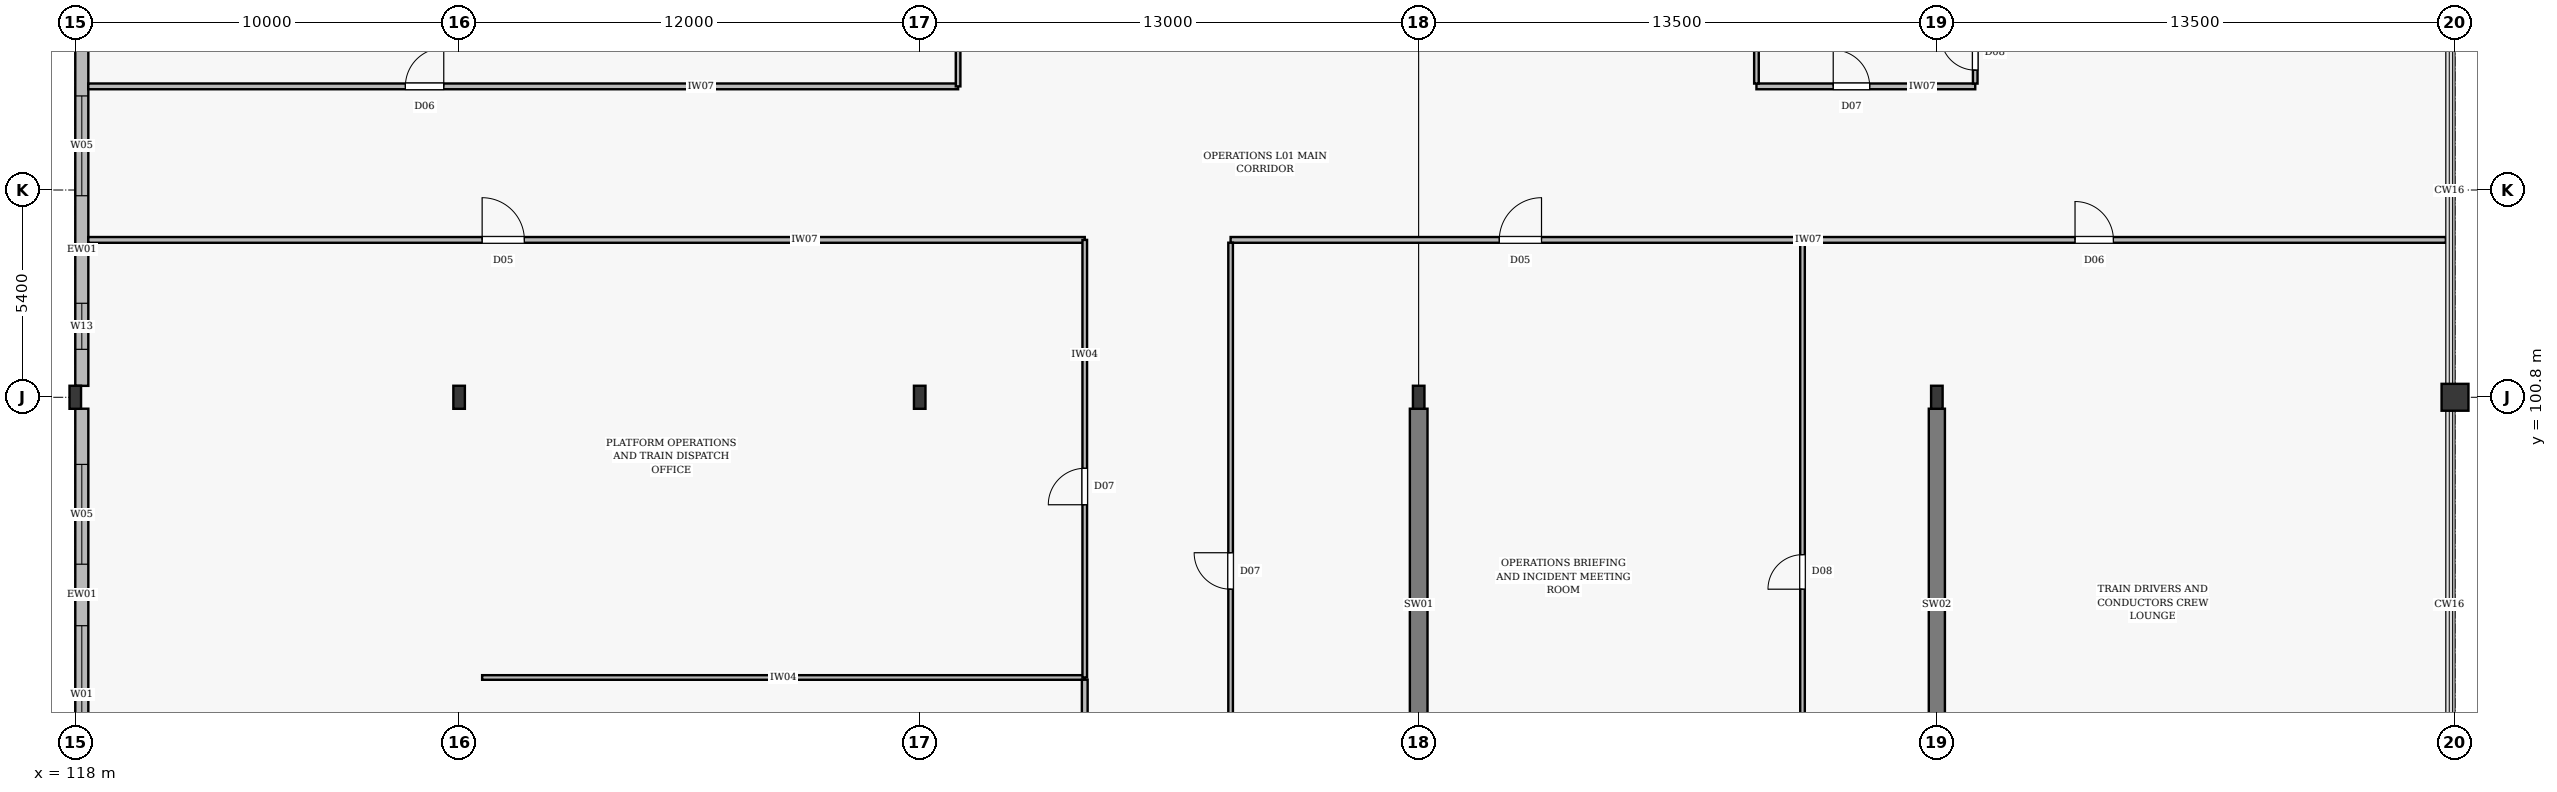
"""IFC4 building model, lengths in metres.
Left out: names, types, materials, properties, quantities, classifications, styles, units other than length and angle.
Written with IfcOpenShell. Run it as: python <this file> out.ifc"""

import sys

from ifc_helpers import new_model, si_unit, direction, frame, frame_2d, origin, origin_2d, place, context, subcontext, project, spatial, rectangle, i_section, extrude, element, fill, save


model = new_model("IFC4")
c1 = context("Model", 3, precision=1e-05, world=origin(), true_north=direction((0.0, 1.0)))
c2 = subcontext(c1, "Body", "Model", "MODEL_VIEW")
j1 = project(units=[si_unit("LENGTHUNIT", "METRE"), si_unit("PLANEANGLEUNIT", "RADIAN")], contexts=[c1])
p1 = place(None, origin())
s1 = spatial("IfcSite", under=j1, at=p1, CompositionType="ELEMENT")
p2 = place(p1, origin())
s2 = spatial("IfcBuilding", under=s1, at=p2, CompositionType="ELEMENT")
p3 = place(p2, frame((0.0, 0.0, 6.6)))
s3 = spatial("IfcBuildingStorey", under=s2, at=p3, CompositionType="ELEMENT", Elevation=6.6)
for number, where, z_axis, x_axis in (
    (1, (118.0, 100.8, 0.0), (0.0, 0.0, 1.0), (1.0, 0.0, 0.0)),
    (2, (128.0, 100.8, 0.0), (0.0, 0.0, 1.0), (1.0, 0.0, 0.0)),
    (3, (140.0, 100.8, 0.0), (0.0, 0.0, 1.0), (1.0, 0.0, 0.0)),
    (4, (153.0, 100.8, 0.0), (0.0, 0.0, 1.0), (1.0, 0.0, 0.0)),
    (5, (166.5, 100.8, 0.0), (0.0, 0.0, 1.0), (1.0, 0.0, 0.0)),
):
    element("IfcColumn", number, at=place(p3, frame(where, z_axis=z_axis, x_axis=x_axis)), inside=s3, PredefinedType="COLUMN", context=c2, shape_type="SweptSolid", body=[
        extrude(i_section(OverallWidth=0.3, OverallDepth=0.6, WebThickness=0.015, FlangeThickness=0.029, at=origin_2d()), origin(), (0.0, 0.0, 1.0), 6.0),
    ])
p4 = place(p3, frame((180.0, 100.8, 0.0), z_axis=(0.0, 0.0, 1.0), x_axis=(1.0, 0.0, 0.0)))
e6 = element("IfcColumn", 6, at=p4, inside=s3, PredefinedType="COLUMN", context=c2, shape_type="SweptSolid", body=[
    extrude(rectangle(XDim=0.7, YDim=0.7, at=origin_2d()), origin(), (0.0, 0.0, 1.0), 6.0),
])
p5 = place(p3, frame((153.0, 90.298, 0.0), z_axis=(0.0, 0.0, 1.0), x_axis=(0.0, 1.0, 0.0)))
e7 = element("IfcWall", 7, at=p5, inside=s3, PredefinedType="SHEAR", context=c2, shape_type="SweptSolid", body=[
    extrude(rectangle(XDim=10.204, YDim=0.46, at=frame_2d((5.102, 0.0))), origin(), (0.0, 0.0, 1.0), 5.75),
])
p6 = place(p3, frame((166.5, 90.298, 0.0), z_axis=(0.0, 0.0, 1.0), x_axis=(0.0, 1.0, 0.0)))
e8 = element("IfcWall", 8, at=p6, inside=s3, PredefinedType="SHEAR", context=c2, shape_type="SweptSolid", body=[
    extrude(rectangle(XDim=10.204, YDim=0.42, at=frame_2d((5.102, 0.0))), origin(), (0.0, 0.0, 1.0), 5.75),
])
p7 = place(p3, frame((118.17, 90.298, 0.0), z_axis=(0.0, 0.0, 1.0), x_axis=(0.0, 1.0, 0.0)))
e9 = element("IfcWall", 9, at=p7, inside=s3, PredefinedType="STANDARD", context=c2, shape_type="SweptSolid", body=[
    extrude(rectangle(XDim=10.204, YDim=0.34, at=frame_2d((5.102, 0.0))), origin(), (0.0, 0.0, 1.0), 5.15),
])
p8 = place(p7, frame((0.951, 0.0, 0.75)))
e10 = element("IfcOpeningElement", 10, at=p8, cuts=e9, PredefinedType="OPENING", context=c2, shape_type="SweptSolid", body=[
    extrude(rectangle(XDim=3.6, YDim=2.8, at=frame_2d((1.8, 1.4))), frame((0.0, 0.182, 0.0), z_axis=(0.0, -1.0, 0.0), x_axis=(1.0, 0.0, 0.0)), (0.0, 0.0, 1.0), 0.364),
])
p9 = place(p7, frame((6.153, 0.0, 0.75)))
e11 = element("IfcOpeningElement", 11, at=p9, cuts=e9, PredefinedType="OPENING", context=c2, shape_type="SweptSolid", body=[
    extrude(rectangle(XDim=2.6, YDim=2.4, at=frame_2d((1.3, 1.2))), frame((0.0, 0.182, 0.0), z_axis=(0.0, -1.0, 0.0), x_axis=(1.0, 0.0, 0.0)), (0.0, 0.0, 1.0), 0.364),
])
p10 = place(p3, frame((118.17, 101.098, 0.0), z_axis=(0.0, 0.0, 1.0), x_axis=(0.0, 1.0, 0.0)))
e12 = element("IfcWall", 12, at=p10, inside=s3, PredefinedType="STANDARD", context=c2, shape_type="SweptSolid", body=[
    extrude(rectangle(XDim=10.204, YDim=0.34, at=frame_2d((5.102, 0.0))), origin(), (0.0, 0.0, 1.0), 5.15),
])
p11 = place(p10, frame((0.951, 0.0, 0.75)))
e13 = element("IfcOpeningElement", 13, at=p11, cuts=e12, PredefinedType="OPENING", context=c2, shape_type="SweptSolid", body=[
    extrude(rectangle(XDim=1.2, YDim=1.8, at=frame_2d((0.6, 0.9))), frame((0.0, 0.182, 0.0), z_axis=(0.0, -1.0, 0.0), x_axis=(1.0, 0.0, 0.0)), (0.0, 0.0, 1.0), 0.364),
])
p12 = place(p10, frame((4.953, 0.0, 0.75)))
e14 = element("IfcOpeningElement", 14, at=p12, cuts=e12, PredefinedType="OPENING", context=c2, shape_type="SweptSolid", body=[
    extrude(rectangle(XDim=2.6, YDim=2.4, at=frame_2d((1.3, 1.2))), frame((0.0, 0.182, 0.0), z_axis=(0.0, -1.0, 0.0), x_axis=(1.0, 0.0, 0.0)), (0.0, 0.0, 1.0), 0.364),
])
p13 = place(p3, frame((118.338, 104.9, 0.0), z_axis=(0.0, 0.0, 1.0), x_axis=(1.0, 0.0, 0.0)))
e15 = element("IfcWall", 15, at=p13, inside=s3, PredefinedType="PARTITIONING", context=c2, shape_type="SweptSolid", body=[
    extrude(rectangle(XDim=25.962, YDim=0.15, at=frame_2d((12.981, 0.0))), origin(), (0.0, 0.0, 1.0), 5.29),
])
p14 = place(p13, frame((10.262, 0.0, 0.005)))
e16 = element("IfcOpeningElement", 16, at=p14, cuts=e15, PredefinedType="OPENING", context=c2, shape_type="SweptSolid", body=[
    extrude(rectangle(XDim=1.1, YDim=2.1, at=frame_2d((0.55, 1.05))), frame((0.0, 0.087, 0.0), z_axis=(0.0, -1.0, 0.0), x_axis=(1.0, 0.0, 0.0)), (0.0, 0.0, 1.0), 0.174),
])
p15 = place(p3, frame((148.1, 104.9, 0.0), z_axis=(0.0, 0.0, 1.0), x_axis=(1.0, 0.0, 0.0)))
e17 = element("IfcWall", 17, at=p15, inside=s3, PredefinedType="PARTITIONING", context=c2, shape_type="SweptSolid", body=[
    extrude(rectangle(XDim=31.662, YDim=0.15, at=frame_2d((15.831, 0.0))), origin(), (0.0, 0.0, 1.0), 5.29),
])
p16 = place(p15, frame((7.0, 0.0, 0.005)))
e18 = element("IfcOpeningElement", 18, at=p16, cuts=e17, PredefinedType="OPENING", context=c2, shape_type="SweptSolid", body=[
    extrude(rectangle(XDim=1.1, YDim=2.1, at=frame_2d((0.55, 1.05))), frame((0.0, 0.087, 0.0), z_axis=(0.0, -1.0, 0.0), x_axis=(1.0, 0.0, 0.0)), (0.0, 0.0, 1.0), 0.174),
])
p17 = place(p15, frame((22.0, 0.0, 0.005)))
e19 = element("IfcOpeningElement", 19, at=p17, cuts=e17, PredefinedType="OPENING", context=c2, shape_type="SweptSolid", body=[
    extrude(rectangle(XDim=1.0, YDim=2.1, at=frame_2d((0.5, 1.05))), frame((0.0, 0.087, 0.0), z_axis=(0.0, -1.0, 0.0), x_axis=(1.0, 0.0, 0.0)), (0.0, 0.0, 1.0), 0.174),
])
p18 = place(p3, frame((128.6, 93.5, 0.0), z_axis=(0.0, 0.0, 1.0), x_axis=(1.0, 0.0, 0.0)))
e20 = element("IfcWall", 20, at=p18, inside=s3, PredefinedType="PARTITIONING", context=c2, shape_type="SweptSolid", body=[
    extrude(rectangle(XDim=15.7, YDim=0.12, at=frame_2d((7.85, 0.0))), origin(), (0.0, 0.0, 1.0), 5.29),
])
p19 = place(p3, frame((144.3, 93.5, 0.0), z_axis=(0.0, 0.0, 1.0), x_axis=(0.0, 1.0, 0.0)))
e21 = element("IfcWall", 21, at=p19, inside=s3, PredefinedType="PARTITIONING", context=c2, shape_type="SweptSolid", body=[
    extrude(rectangle(XDim=11.4, YDim=0.12, at=frame_2d((5.7, 0.0))), origin(), (0.0, 0.0, 1.0), 5.14),
])
p20 = place(p19, frame((4.5, 0.0, 0.005)))
e22 = element("IfcOpeningElement", 22, at=p20, cuts=e21, PredefinedType="OPENING", context=c2, shape_type="SweptSolid", body=[
    extrude(rectangle(XDim=0.95, YDim=2.1, at=frame_2d((0.475, 1.05))), frame((0.0, 0.072, 0.0), z_axis=(0.0, -1.0, 0.0), x_axis=(1.0, 0.0, 0.0)), (0.0, 0.0, 1.0), 0.144),
])
p21 = place(p3, frame((144.3, 79.478, 0.0), z_axis=(0.0, 0.0, 1.0), x_axis=(0.0, 1.0, 0.0)))
e23 = element("IfcWall", 23, at=p21, inside=s3, PredefinedType="PARTITIONING", context=c2, shape_type="SweptSolid", body=[
    extrude(rectangle(XDim=13.964, YDim=0.15, at=frame_2d((6.982, 0.0))), origin(), (0.0, 0.0, 1.0), 5.14),
])
p22 = place(p3, frame((148.1, 79.478, 0.0), z_axis=(0.0, 0.0, 1.0), x_axis=(0.0, 1.0, 0.0)))
e24 = element("IfcWall", 24, at=p22, inside=s3, PredefinedType="PARTITIONING", context=c2, shape_type="SweptSolid", body=[
    extrude(rectangle(XDim=25.349, YDim=0.12, at=frame_2d((12.674, 0.0))), origin(), (0.0, 0.0, 1.0), 5.14),
])
p23 = place(p22, frame((16.322, 0.0, 0.005)))
e25 = element("IfcOpeningElement", 25, at=p23, cuts=e24, PredefinedType="OPENING", context=c2, shape_type="SweptSolid", body=[
    extrude(rectangle(XDim=0.95, YDim=2.1, at=frame_2d((0.475, 1.05))), frame((0.0, 0.072, 0.0), z_axis=(0.0, -1.0, 0.0), x_axis=(1.0, 0.0, 0.0)), (0.0, 0.0, 1.0), 0.144),
])
p24 = place(p3, frame((118.338, 108.9, 0.0), z_axis=(0.0, 0.0, 1.0), x_axis=(1.0, 0.0, 0.0)))
e26 = element("IfcWall", 26, at=p24, inside=s3, PredefinedType="PARTITIONING", context=c2, shape_type="SweptSolid", body=[
    extrude(rectangle(XDim=22.662, YDim=0.15, at=frame_2d((11.331, 0.0))), origin(), (0.0, 0.0, 1.0), 5.29),
])
p25 = place(p24, frame((8.262, 0.0, 0.005)))
e27 = element("IfcOpeningElement", 27, at=p25, cuts=e26, PredefinedType="OPENING", context=c2, shape_type="SweptSolid", body=[
    extrude(rectangle(XDim=1.0, YDim=2.1, at=frame_2d((0.5, 1.05))), frame((0.0, 0.087, 0.0), z_axis=(0.0, -1.0, 0.0), x_axis=(1.0, 0.0, 0.0)), (0.0, 0.0, 1.0), 0.174),
])
p26 = place(p3, frame((141.0, 108.9, 0.0), z_axis=(0.0, 0.0, 1.0), x_axis=(0.0, 1.0, 0.0)))
e28 = element("IfcWall", 28, at=p26, inside=s3, PredefinedType="PARTITIONING", context=c2, shape_type="SweptSolid", body=[
    extrude(rectangle(XDim=3.4, YDim=0.12, at=frame_2d((1.7, 0.0))), origin(), (0.0, 0.0, 1.0), 5.14),
])
p27 = place(p3, frame((161.8, 108.9, 0.0), z_axis=(0.0, 0.0, 1.0), x_axis=(1.0, 0.0, 0.0)))
e29 = element("IfcWall", 29, at=p27, inside=s3, PredefinedType="PARTITIONING", context=c2, shape_type="SweptSolid", body=[
    extrude(rectangle(XDim=5.7, YDim=0.15, at=frame_2d((2.85, 0.0))), origin(), (0.0, 0.0, 1.0), 5.29),
])
p28 = place(p27, frame((2.0, 0.0, 0.005)))
e30 = element("IfcOpeningElement", 30, at=p28, cuts=e29, PredefinedType="OPENING", context=c2, shape_type="SweptSolid", body=[
    extrude(rectangle(XDim=0.95, YDim=2.1, at=frame_2d((0.475, 1.05))), frame((0.0, 0.087, 0.0), z_axis=(0.0, -1.0, 0.0), x_axis=(1.0, 0.0, 0.0)), (0.0, 0.0, 1.0), 0.174),
])
p29 = place(p3, frame((167.5, 108.973, 0.0), z_axis=(0.0, 0.0, 1.0), x_axis=(0.0, 1.0, 0.0)))
e31 = element("IfcWall", 31, at=p29, inside=s3, PredefinedType="PARTITIONING", context=c2, shape_type="SweptSolid", body=[
    extrude(rectangle(XDim=6.427, YDim=0.12, at=frame_2d((3.213, 0.0))), origin(), (0.0, 0.0, 1.0), 5.14),
])
p30 = place(p29, frame((0.35, 0.0, 0.005)))
e32 = element("IfcOpeningElement", 32, at=p30, cuts=e31, PredefinedType="OPENING", context=c2, shape_type="SweptSolid", body=[
    extrude(rectangle(XDim=0.9, YDim=2.1, at=frame_2d((0.45, 1.05))), frame((0.0, 0.072, 0.0), z_axis=(0.0, -1.0, 0.0), x_axis=(1.0, 0.0, 0.0)), (0.0, 0.0, 1.0), 0.144),
])
p31 = place(p3, frame((161.8, 108.973, 0.0), z_axis=(0.0, 0.0, 1.0), x_axis=(0.0, 1.0, 0.0)))
e33 = element("IfcWall", 33, at=p31, inside=s3, PredefinedType="PARTITIONING", context=c2, shape_type="SweptSolid", body=[
    extrude(rectangle(XDim=13.189, YDim=0.12, at=frame_2d((6.595, 0.0))), origin(), (0.0, 0.0, 1.0), 5.14),
])
p32 = place(p3, frame((163.0, 79.478, 0.0), z_axis=(0.0, 0.0, 1.0), x_axis=(0.0, 1.0, 0.0)))
e34 = element("IfcWall", 34, at=p32, inside=s3, PredefinedType="PARTITIONING", context=c2, shape_type="SweptSolid", body=[
    extrude(rectangle(XDim=25.349, YDim=0.12, at=frame_2d((12.674, 0.0))), origin(), (0.0, 0.0, 1.0), 5.14),
])
p33 = place(p32, frame((16.322, 0.0, 0.005)))
e35 = element("IfcOpeningElement", 35, at=p33, cuts=e34, PredefinedType="OPENING", context=c2, shape_type="SweptSolid", body=[
    extrude(rectangle(XDim=0.9, YDim=2.1, at=frame_2d((0.45, 1.05))), frame((0.0, 0.072, 0.0), z_axis=(0.0, -1.0, 0.0), x_axis=(1.0, 0.0, 0.0)), (0.0, 0.0, 1.0), 0.144),
])
p34 = place(p8, origin())
e36 = element("IfcWindow", 36, at=p34, inside=s3, PartitioningType="DOUBLE_PANEL_VERTICAL", PredefinedType="WINDOW", context=c2, shape_type="SweptSolid", body=[
    extrude(rectangle(XDim=3.6, YDim=2.8, at=frame_2d((1.8, 1.4))), frame((0.0, 0.03, 0.0), z_axis=(0.0, -1.0, 0.0), x_axis=(1.0, 0.0, 0.0)), (0.0, 0.0, 1.0), 0.06),
])
fill(e10, e36)
p35 = place(p9, origin())
e37 = element("IfcWindow", 37, at=p35, inside=s3, PartitioningType="DOUBLE_PANEL_VERTICAL", PredefinedType="WINDOW", context=c2, shape_type="SweptSolid", body=[
    extrude(rectangle(XDim=2.6, YDim=2.4, at=frame_2d((1.3, 1.2))), frame((0.0, 0.03, 0.0), z_axis=(0.0, -1.0, 0.0), x_axis=(1.0, 0.0, 0.0)), (0.0, 0.0, 1.0), 0.06),
])
fill(e11, e37)
p36 = place(p11, origin())
e38 = element("IfcWindow", 38, at=p36, inside=s3, PartitioningType="DOUBLE_PANEL_VERTICAL", PredefinedType="WINDOW", context=c2, shape_type="SweptSolid", body=[
    extrude(rectangle(XDim=1.2, YDim=1.8, at=frame_2d((0.6, 0.9))), frame((0.0, 0.03, 0.0), z_axis=(0.0, -1.0, 0.0), x_axis=(1.0, 0.0, 0.0)), (0.0, 0.0, 1.0), 0.06),
])
fill(e13, e38)
p37 = place(p12, origin())
e39 = element("IfcWindow", 39, at=p37, inside=s3, PartitioningType="DOUBLE_PANEL_VERTICAL", PredefinedType="WINDOW", context=c2, shape_type="SweptSolid", body=[
    extrude(rectangle(XDim=2.6, YDim=2.4, at=frame_2d((1.3, 1.2))), frame((0.0, 0.03, 0.0), z_axis=(0.0, -1.0, 0.0), x_axis=(1.0, 0.0, 0.0)), (0.0, 0.0, 1.0), 0.06),
])
fill(e14, e39)
p38 = place(p14, origin())
e40 = element("IfcDoor", 40, at=p38, inside=s3, OperationType="SINGLE_SWING_LEFT", PredefinedType="DOOR", context=c2, shape_type="SweptSolid", body=[
    extrude(rectangle(XDim=1.1, YDim=2.1, at=frame_2d((0.55, 1.05))), frame((0.0, 0.025, 0.0), z_axis=(0.0, -1.0, 0.0), x_axis=(1.0, 0.0, 0.0)), (0.0, 0.0, 1.0), 0.05),
])
fill(e16, e40)
p39 = place(p16, origin())
e41 = element("IfcDoor", 41, at=p39, inside=s3, OperationType="SINGLE_SWING_RIGHT", PredefinedType="DOOR", context=c2, shape_type="SweptSolid", body=[
    extrude(rectangle(XDim=1.1, YDim=2.1, at=frame_2d((0.55, 1.05))), frame((0.0, 0.025, 0.0), z_axis=(0.0, -1.0, 0.0), x_axis=(1.0, 0.0, 0.0)), (0.0, 0.0, 1.0), 0.05),
])
fill(e18, e41)
p40 = place(p17, origin())
e42 = element("IfcDoor", 42, at=p40, inside=s3, OperationType="SINGLE_SWING_LEFT", PredefinedType="DOOR", context=c2, shape_type="SweptSolid", body=[
    extrude(rectangle(XDim=1.0, YDim=2.1, at=frame_2d((0.5, 1.05))), frame((0.0, 0.025, 0.0), z_axis=(0.0, -1.0, 0.0), x_axis=(1.0, 0.0, 0.0)), (0.0, 0.0, 1.0), 0.05),
])
fill(e19, e42)
p41 = place(p20, origin())
e43 = element("IfcDoor", 43, at=p41, inside=s3, OperationType="SINGLE_SWING_LEFT", PredefinedType="DOOR", context=c2, shape_type="SweptSolid", body=[
    extrude(rectangle(XDim=0.95, YDim=2.1, at=frame_2d((0.475, 1.05))), frame((0.0, 0.025, 0.0), z_axis=(0.0, -1.0, 0.0), x_axis=(1.0, 0.0, 0.0)), (0.0, 0.0, 1.0), 0.05),
])
fill(e22, e43)
p42 = place(p23, origin())
e44 = element("IfcDoor", 44, at=p42, inside=s3, OperationType="SINGLE_SWING_RIGHT", PredefinedType="DOOR", context=c2, shape_type="SweptSolid", body=[
    extrude(rectangle(XDim=0.95, YDim=2.1, at=frame_2d((0.475, 1.05))), frame((0.0, 0.025, 0.0), z_axis=(0.0, -1.0, 0.0), x_axis=(1.0, 0.0, 0.0)), (0.0, 0.0, 1.0), 0.05),
])
fill(e25, e44)
p43 = place(p25, origin())
e45 = element("IfcDoor", 45, at=p43, inside=s3, OperationType="SINGLE_SWING_RIGHT", PredefinedType="DOOR", context=c2, shape_type="SweptSolid", body=[
    extrude(rectangle(XDim=1.0, YDim=2.1, at=frame_2d((0.5, 1.05))), frame((0.0, 0.025, 0.0), z_axis=(0.0, -1.0, 0.0), x_axis=(1.0, 0.0, 0.0)), (0.0, 0.0, 1.0), 0.05),
])
fill(e27, e45)
p44 = place(p28, origin())
e46 = element("IfcDoor", 46, at=p44, inside=s3, OperationType="SINGLE_SWING_LEFT", PredefinedType="DOOR", context=c2, shape_type="SweptSolid", body=[
    extrude(rectangle(XDim=0.95, YDim=2.1, at=frame_2d((0.475, 1.05))), frame((0.0, 0.025, 0.0), z_axis=(0.0, -1.0, 0.0), x_axis=(1.0, 0.0, 0.0)), (0.0, 0.0, 1.0), 0.05),
])
fill(e30, e46)
p45 = place(p30, origin())
e47 = element("IfcDoor", 47, at=p45, inside=s3, OperationType="SINGLE_SWING_RIGHT", PredefinedType="DOOR", context=c2, shape_type="SweptSolid", body=[
    extrude(rectangle(XDim=0.9, YDim=2.1, at=frame_2d((0.45, 1.05))), frame((0.0, 0.025, 0.0), z_axis=(0.0, -1.0, 0.0), x_axis=(1.0, 0.0, 0.0)), (0.0, 0.0, 1.0), 0.05),
])
fill(e32, e47)
p46 = place(p33, origin())
e48 = element("IfcDoor", 48, at=p46, inside=s3, OperationType="SINGLE_SWING_LEFT", PredefinedType="DOOR", context=c2, shape_type="SweptSolid", body=[
    extrude(rectangle(XDim=0.9, YDim=2.1, at=frame_2d((0.45, 1.05))), frame((0.0, 0.025, 0.0), z_axis=(0.0, -1.0, 0.0), x_axis=(1.0, 0.0, 0.0)), (0.0, 0.0, 1.0), 0.05),
])
fill(e35, e48)
save(model, sys.argv[1])
